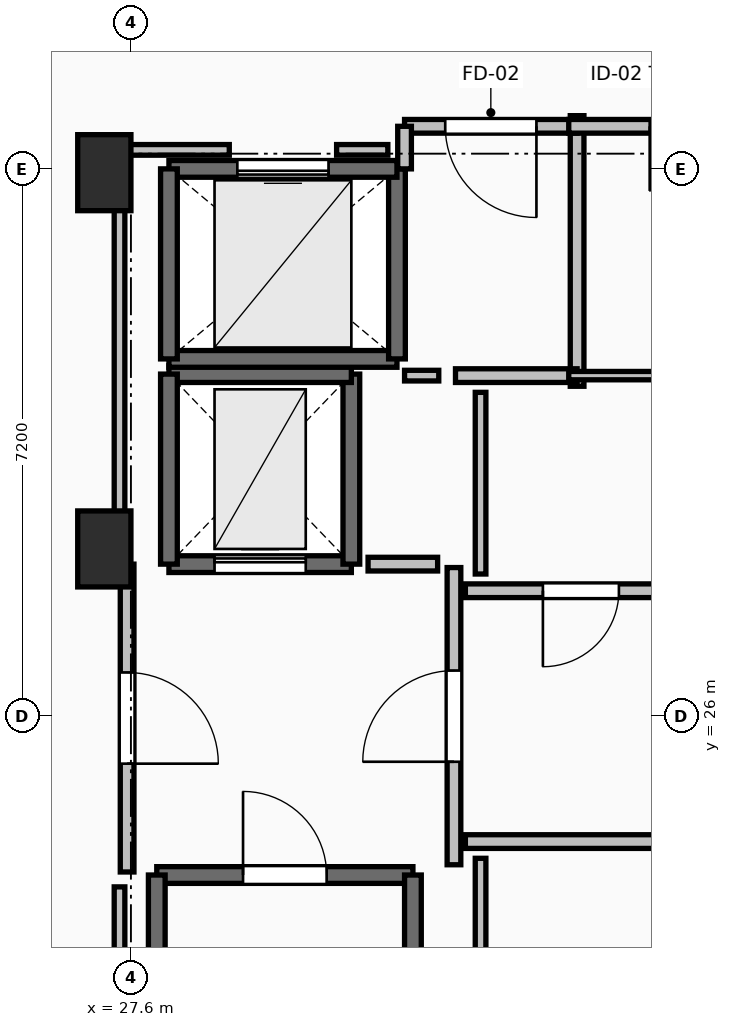
"""IFC4 building model, lengths in metres.
Left out: names, types, materials, properties, quantities, classifications, styles, units other than length and angle.
Written with IfcOpenShell. Run it as: python <this file> out.ifc"""

import sys

from ifc_helpers import new_model, si_unit, direction, frame, frame_2d, origin, origin_2d, place, context, subcontext, project, spatial, rectangle, extrude, element, fill, save


model = new_model("IFC4")
c1 = context("Model", 3, precision=1e-05, world=origin(), true_north=direction((0.0, 1.0)))
c2 = subcontext(c1, "Body", "Model", "MODEL_VIEW")
j1 = project(units=[si_unit("LENGTHUNIT", "METRE"), si_unit("PLANEANGLEUNIT", "RADIAN")], contexts=[c1])
p1 = place(None, origin())
s1 = spatial("IfcSite", under=j1, at=p1, CompositionType="ELEMENT")
p2 = place(p1, origin())
s2 = spatial("IfcBuilding", under=s1, at=p2, CompositionType="ELEMENT")
p3 = place(p2, frame((0.0, 0.0, 262.65)))
s3 = spatial("IfcBuildingStorey", under=s2, at=p3, CompositionType="ELEMENT", Elevation=262.65)
for number, where, z_axis, x_axis in (
    (1, (27.25, 28.2, 0.0), (0.0, 0.0, 1.0), (1.0, 0.0, 0.0)),
    (2, (27.25, 33.15, 0.0), (0.0, 0.0, 1.0), (1.0, 0.0, 0.0)),
):
    element("IfcColumn", number, at=place(p3, frame(where, z_axis=z_axis, x_axis=x_axis)), inside=s3, PredefinedType="PILASTER", context=c2, shape_type="SweptSolid", body=[
        extrude(rectangle(XDim=0.7, YDim=1.0, at=origin_2d()), origin(), (0.0, 0.0, 1.0), 3.55),
    ])
p4 = place(p3, frame((27.94, 23.91, 0.0), z_axis=(0.0, 0.0, 1.0), x_axis=(1.0, 0.0, 0.0)))
e3 = element("IfcWall", 3, at=p4, inside=s3, PredefinedType="SOLIDWALL", context=c2, shape_type="SweptSolid", body=[
    extrude(rectangle(XDim=3.37, YDim=0.22, at=frame_2d((1.685, 0.0))), origin(), (0.0, 0.0, 1.0), 3.29),
])
p5 = place(p4, frame((1.135, 0.0, 0.0)))
e4 = element("IfcOpeningElement", 4, at=p5, cuts=e3, PredefinedType="OPENING", context=c2, shape_type="SweptSolid", body=[
    extrude(rectangle(XDim=1.1, YDim=2.15, at=frame_2d((0.55, 1.075))), frame((0.0, 0.125, 0.0), z_axis=(0.0, -1.0, 0.0), x_axis=(1.0, 0.0, 0.0)), (0.0, 0.0, 1.0), 0.25),
])
for number, where, z_axis, x_axis in (
    (5, (31.31, 23.91, 0.0), (0.0, 0.0, 1.0), (0.0, -1.0, 0.0)),
    (6, (27.94, 16.49, 0.0), (0.0, 0.0, 1.0), (0.0, 1.0, 0.0)),
):
    element("IfcWall", number, at=place(p3, frame(where, z_axis=z_axis, x_axis=x_axis)), inside=s3, PredefinedType="SOLIDWALL", context=c2, shape_type="SweptSolid", body=[
        extrude(rectangle(XDim=7.42, YDim=0.22, at=frame_2d((3.71, 0.0))), origin(), (0.0, 0.0, 1.0), 3.29),
    ])
p6 = place(p3, frame((28.1, 28.0, 0.0), z_axis=(0.0, 0.0, 1.0), x_axis=(1.0, 0.0, 0.0)))
e7 = element("IfcWall", 7, at=p6, inside=s3, PredefinedType="SHEAR", context=c2, shape_type="SweptSolid", body=[
    extrude(rectangle(XDim=2.4, YDim=0.22, at=frame_2d((1.2, 0.0))), origin(), (0.0, 0.0, 1.0), 3.29),
])
p7 = place(p6, frame((0.6, 0.0, 0.0)))
e8 = element("IfcOpeningElement", 8, at=p7, cuts=e7, PredefinedType="OPENING", context=c2, shape_type="SweptSolid", body=[
    extrude(rectangle(XDim=1.2, YDim=2.2, at=frame_2d((0.6, 1.1))), frame((0.0, 0.125, 0.0), z_axis=(0.0, -1.0, 0.0), x_axis=(1.0, 0.0, 0.0)), (0.0, 0.0, 1.0), 0.25),
])
p8 = place(p3, frame((30.5, 28.0, 0.0), z_axis=(0.0, 0.0, 1.0), x_axis=(0.0, 1.0, 0.0)))
e9 = element("IfcWall", 9, at=p8, inside=s3, PredefinedType="SHEAR", context=c2, shape_type="SweptSolid", body=[
    extrude(rectangle(XDim=2.5, YDim=0.22, at=frame_2d((1.25, 0.0))), origin(), (0.0, 0.0, 1.0), 3.29),
])
p9 = place(p3, frame((30.5, 30.5, 0.0), z_axis=(0.0, 0.0, 1.0), x_axis=(-1.0, 0.0, 0.0)))
e10 = element("IfcWall", 10, at=p9, inside=s3, PredefinedType="SHEAR", context=c2, shape_type="SweptSolid", body=[
    extrude(rectangle(XDim=2.4, YDim=0.22, at=frame_2d((1.2, 0.0))), origin(), (0.0, 0.0, 1.0), 3.29),
])
p10 = place(p3, frame((28.1, 30.5, 0.0), z_axis=(0.0, 0.0, 1.0), x_axis=(0.0, -1.0, 0.0)))
e11 = element("IfcWall", 11, at=p10, inside=s3, PredefinedType="SHEAR", context=c2, shape_type="SweptSolid", body=[
    extrude(rectangle(XDim=2.5, YDim=0.22, at=frame_2d((1.25, 0.0))), origin(), (0.0, 0.0, 1.0), 3.29),
])
p11 = place(p3, frame((28.1, 30.7, 0.0), z_axis=(0.0, 0.0, 1.0), x_axis=(1.0, 0.0, 0.0)))
e12 = element("IfcWall", 12, at=p11, inside=s3, PredefinedType="SOLIDWALL", context=c2, shape_type="SweptSolid", body=[
    extrude(rectangle(XDim=3.0, YDim=0.22, at=frame_2d((1.5, 0.0))), origin(), (0.0, 0.0, 1.0), 3.29),
])
p12 = place(p3, frame((31.1, 30.7, 0.0), z_axis=(0.0, 0.0, 1.0), x_axis=(0.0, 1.0, 0.0)))
e13 = element("IfcWall", 13, at=p12, inside=s3, PredefinedType="SOLIDWALL", context=c2, shape_type="SweptSolid", body=[
    extrude(rectangle(XDim=2.5, YDim=0.22, at=frame_2d((1.25, 0.0))), origin(), (0.0, 0.0, 1.0), 3.29),
])
p13 = place(p3, frame((31.1, 33.2, 0.0), z_axis=(0.0, 0.0, 1.0), x_axis=(-1.0, 0.0, 0.0)))
e14 = element("IfcWall", 14, at=p13, inside=s3, PredefinedType="SOLIDWALL", context=c2, shape_type="SweptSolid", body=[
    extrude(rectangle(XDim=3.0, YDim=0.22, at=frame_2d((1.5, 0.0))), origin(), (0.0, 0.0, 1.0), 3.29),
])
p14 = place(p13, frame((0.9, 0.0, 0.0)))
e15 = element("IfcOpeningElement", 15, at=p14, cuts=e14, PredefinedType="OPENING", context=c2, shape_type="SweptSolid", body=[
    extrude(rectangle(XDim=1.2, YDim=2.2, at=frame_2d((0.6, 1.1))), frame((0.0, 0.125, 0.0), z_axis=(0.0, -1.0, 0.0), x_axis=(1.0, 0.0, 0.0)), (0.0, 0.0, 1.0), 0.25),
])
p15 = place(p3, frame((28.1, 33.2, 0.0), z_axis=(0.0, 0.0, 1.0), x_axis=(0.0, -1.0, 0.0)))
e16 = element("IfcWall", 16, at=p15, inside=s3, PredefinedType="SOLIDWALL", context=c2, shape_type="SweptSolid", body=[
    extrude(rectangle(XDim=2.5, YDim=0.22, at=frame_2d((1.25, 0.0))), origin(), (0.0, 0.0, 1.0), 3.29),
])
p16 = place(p3, frame((31.85, 24.045, 0.0), z_axis=(0.0, 0.0, 1.0), x_axis=(0.0, 1.0, 0.0)))
e17 = element("IfcWall", 17, at=p16, inside=s3, PredefinedType="PARTITIONING", context=c2, shape_type="SweptSolid", body=[
    extrude(rectangle(XDim=3.91, YDim=0.18, at=frame_2d((1.955, 0.0))), origin(), (0.0, 0.0, 1.0), 3.29),
])
p17 = place(p16, frame((1.355, 0.0, 0.0)))
e18 = element("IfcOpeningElement", 18, at=p17, cuts=e17, PredefinedType="OPENING", context=c2, shape_type="SweptSolid", body=[
    extrude(rectangle(XDim=1.2, YDim=2.15, at=frame_2d((0.6, 1.075))), frame((0.0, 0.105, 0.0), z_axis=(0.0, -1.0, 0.0), x_axis=(1.0, 0.0, 0.0)), (0.0, 0.0, 1.0), 0.21),
])
p18 = place(p3, frame((27.55, 28.0, 0.0), z_axis=(0.0, 0.0, 1.0), x_axis=(0.0, -1.0, 0.0)))
e19 = element("IfcWall", 19, at=p18, inside=s3, PredefinedType="PARTITIONING", context=c2, shape_type="SweptSolid", body=[
    extrude(rectangle(XDim=4.05, YDim=0.18, at=frame_2d((2.025, 0.0))), origin(), (0.0, 0.0, 1.0), 3.29),
])
p19 = place(p18, frame((1.425, 0.0, 0.0)))
e20 = element("IfcOpeningElement", 20, at=p19, cuts=e19, PredefinedType="OPENING", context=c2, shape_type="SweptSolid", body=[
    extrude(rectangle(XDim=1.2, YDim=2.15, at=frame_2d((0.6, 1.075))), frame((0.0, 0.105, 0.0), z_axis=(0.0, -1.0, 0.0), x_axis=(1.0, 0.0, 0.0)), (0.0, 0.0, 1.0), 0.21),
])
p20 = place(p3, frame((33.47, 30.34, 0.0), z_axis=(0.0, 0.0, 1.0), x_axis=(0.0, 1.0, 0.0)))
e21 = element("IfcWall", 21, at=p20, inside=s3, PredefinedType="PARTITIONING", context=c2, shape_type="SweptSolid", body=[
    extrude(rectangle(XDim=3.56, YDim=0.18, at=frame_2d((1.78, 0.0))), origin(), (0.0, 0.0, 1.0), 3.29),
])
p21 = place(p3, frame((31.87, 30.48, 0.0), z_axis=(0.0, 0.0, 1.0), x_axis=(1.0, 0.0, 0.0)))
e22 = element("IfcWall", 22, at=p21, inside=s3, PredefinedType="PARTITIONING", context=c2, shape_type="SweptSolid", body=[
    extrude(rectangle(XDim=1.6, YDim=0.18, at=frame_2d((0.8, 0.0))), origin(), (0.0, 0.0, 1.0), 3.29),
])
p22 = place(p3, frame((33.47, 33.76, 0.0), z_axis=(0.0, 0.0, 1.0), x_axis=(-1.0, 0.0, 0.0)))
e23 = element("IfcWall", 23, at=p22, inside=s3, PredefinedType="PARTITIONING", context=c2, shape_type="SweptSolid", body=[
    extrude(rectangle(XDim=2.27, YDim=0.18, at=frame_2d((1.135, 0.0))), origin(), (0.0, 0.0, 1.0), 3.29),
])
p23 = place(p22, frame((0.535, 0.0, 0.0)))
e24 = element("IfcOpeningElement", 24, at=p23, cuts=e23, PredefinedType="OPENING", context=c2, shape_type="SweptSolid", body=[
    extrude(rectangle(XDim=1.2, YDim=2.15, at=frame_2d((0.6, 1.075))), frame((0.0, 0.105, 0.0), z_axis=(0.0, -1.0, 0.0), x_axis=(1.0, 0.0, 0.0)), (0.0, 0.0, 1.0), 0.21),
])
p24 = place(p3, frame((31.2, 33.76, 0.0), z_axis=(0.0, 0.0, 1.0), x_axis=(0.0, -1.0, 0.0)))
e25 = element("IfcWall", 25, at=p24, inside=s3, PredefinedType="PARTITIONING", context=c2, shape_type="SweptSolid", body=[
    extrude(rectangle(XDim=0.56, YDim=0.18, at=frame_2d((0.28, 0.0))), origin(), (0.0, 0.0, 1.0), 3.29),
])
p25 = place(p3, frame((35.04, 27.65, 0.0), z_axis=(0.0, 0.0, 1.0), x_axis=(-1.0, 0.0, 0.0)))
e26 = element("IfcWall", 26, at=p25, inside=s3, PredefinedType="PARTITIONING", context=c2, shape_type="SweptSolid", body=[
    extrude(rectangle(XDim=3.04, YDim=0.18, at=frame_2d((1.52, 0.0))), origin(), (0.0, 0.0, 1.0), 3.29),
])
p26 = place(p25, frame((1.02, 0.0, 0.0)))
e27 = element("IfcOpeningElement", 27, at=p26, cuts=e26, PredefinedType="OPENING", context=c2, shape_type="SweptSolid", body=[
    extrude(rectangle(XDim=1.0, YDim=2.15, at=frame_2d((0.5, 1.075))), frame((0.0, 0.105, 0.0), z_axis=(0.0, -1.0, 0.0), x_axis=(1.0, 0.0, 0.0)), (0.0, 0.0, 1.0), 0.21),
])
p27 = place(p3, frame((32.0, 24.35, 0.0), z_axis=(0.0, 0.0, 1.0), x_axis=(1.0, 0.0, 0.0)))
e28 = element("IfcWall", 28, at=p27, inside=s3, PredefinedType="PARTITIONING", context=c2, shape_type="SweptSolid", body=[
    extrude(rectangle(XDim=6.645, YDim=0.18, at=frame_2d((3.323, 0.0))), origin(), (0.0, 0.0, 1.0), 3.29),
])
p28 = place(p27, frame((2.897, 0.0, 0.0)))
e29 = element("IfcOpeningElement", 29, at=p28, cuts=e28, PredefinedType="OPENING", context=c2, shape_type="SweptSolid", body=[
    extrude(rectangle(XDim=0.85, YDim=2.1, at=frame_2d((0.425, 1.05))), frame((0.0, 0.105, 0.0), z_axis=(0.0, -1.0, 0.0), x_axis=(1.0, 0.0, 0.0)), (0.0, 0.0, 1.0), 0.21),
])
p29 = place(p3, frame((33.36, 30.48, 0.0), z_axis=(0.0, 0.0, 1.0), x_axis=(1.0, 0.0, 0.0)))
e30 = element("IfcWall", 30, at=p29, inside=s3, PredefinedType="PARTITIONING", context=c2, shape_type="SweptSolid", body=[
    extrude(rectangle(XDim=1.81, YDim=0.11, at=frame_2d((0.905, 0.0))), origin(), (0.0, 0.0, 1.0), 3.29),
])
p30 = place(p3, frame((36.34, 33.76, 0.0), z_axis=(0.0, 0.0, 1.0), x_axis=(-1.0, 0.0, 0.0)))
e31 = element("IfcWall", 31, at=p30, inside=s3, PredefinedType="PARTITIONING", context=c2, shape_type="SweptSolid", body=[
    extrude(rectangle(XDim=2.98, YDim=0.18, at=frame_2d((1.49, 0.0))), origin(), (0.0, 0.0, 1.0), 3.29),
])
p31 = place(p30, frame((1.065, 0.0, 0.0)))
e32 = element("IfcOpeningElement", 32, at=p31, cuts=e31, PredefinedType="OPENING", context=c2, shape_type="SweptSolid", body=[
    extrude(rectangle(XDim=0.85, YDim=2.1, at=frame_2d((0.425, 1.05))), frame((0.0, 0.105, 0.0), z_axis=(0.0, -1.0, 0.0), x_axis=(1.0, 0.0, 0.0)), (0.0, 0.0, 1.0), 0.21),
])
p32 = place(p3, frame((31.635, 28.0, 0.0), z_axis=(0.0, 0.0, 1.0), x_axis=(-1.0, 0.0, 0.0)))
e33 = element("IfcWall", 33, at=p32, inside=s3, PredefinedType="PARTITIONING", context=c2, shape_type="SweptSolid", body=[
    extrude(rectangle(XDim=0.915, YDim=0.18, at=frame_2d((0.458, 0.0))), origin(), (0.0, 0.0, 1.0), 3.29),
])
p33 = place(p3, frame((31.2, 30.48, 0.0), z_axis=(0.0, 0.0, 1.0), x_axis=(1.0, 0.0, 0.0)))
e34 = element("IfcWall", 34, at=p33, inside=s3, PredefinedType="PARTITIONING", context=c2, shape_type="SweptSolid", body=[
    extrude(rectangle(XDim=0.45, YDim=0.14, at=frame_2d((0.225, 0.0))), origin(), (0.0, 0.0, 1.0), 3.29),
])
p34 = place(p3, frame((32.2, 30.26, 0.0), z_axis=(0.0, 0.0, 1.0), x_axis=(0.0, -1.0, 0.0)))
e35 = element("IfcWall", 35, at=p34, inside=s3, PredefinedType="PARTITIONING", context=c2, shape_type="SweptSolid", body=[
    extrude(rectangle(XDim=2.39, YDim=0.14, at=frame_2d((1.195, 0.0))), origin(), (0.0, 0.0, 1.0), 3.29),
])
p35 = place(p3, frame((32.2, 24.13, 0.0), z_axis=(0.0, 0.0, 1.0), x_axis=(0.0, -1.0, 0.0)))
e36 = element("IfcWall", 36, at=p35, inside=s3, PredefinedType="PARTITIONING", context=c2, shape_type="SweptSolid", body=[
    extrude(rectangle(XDim=2.46, YDim=0.14, at=frame_2d((1.23, 0.0))), origin(), (0.0, 0.0, 1.0), 2.482),
])
p36 = place(p3, frame((30.98, 33.45, 0.0), z_axis=(0.0, 0.0, 1.0), x_axis=(-1.0, 0.0, 0.0)))
e37 = element("IfcWall", 37, at=p36, inside=s3, PredefinedType="PARTITIONING", context=c2, shape_type="SweptSolid", body=[
    extrude(rectangle(XDim=0.674, YDim=0.14, at=frame_2d((0.337, 0.0))), origin(), (0.0, 0.0, 1.0), 3.29),
])
p37 = place(p3, frame((28.894, 33.45, 0.0), z_axis=(0.0, 0.0, 1.0), x_axis=(-1.0, 0.0, 0.0)))
e38 = element("IfcWall", 38, at=p37, inside=s3, PredefinedType="PARTITIONING", context=c2, shape_type="SweptSolid", body=[
    extrude(rectangle(XDim=1.444, YDim=0.14, at=frame_2d((0.722, 0.0))), origin(), (0.0, 0.0, 1.0), 2.482),
])
p38 = place(p3, frame((27.45, 33.45, 0.0), z_axis=(0.0, 0.0, 1.0), x_axis=(0.0, -1.0, 0.0)))
e39 = element("IfcWall", 39, at=p38, inside=s3, PredefinedType="PARTITIONING", context=c2, shape_type="SweptSolid", body=[
    extrude(rectangle(XDim=5.254, YDim=0.14, at=frame_2d((2.627, 0.0))), origin(), (0.0, 0.0, 1.0), 2.482),
])
p39 = place(p3, frame((27.45, 23.754, 0.0), z_axis=(0.0, 0.0, 1.0), x_axis=(0.0, -1.0, 0.0)))
e40 = element("IfcWall", 40, at=p39, inside=s3, PredefinedType="PARTITIONING", context=c2, shape_type="SweptSolid", body=[
    extrude(rectangle(XDim=7.514, YDim=0.14, at=frame_2d((3.757, 0.0))), origin(), (0.0, 0.0, 1.0), 2.482),
])
p40 = place(p5, origin())
e41 = element("IfcDoor", 41, at=p40, inside=s3, OperationType="SINGLE_SWING_LEFT", PredefinedType="DOOR", context=c2, shape_type="SweptSolid", body=[
    extrude(rectangle(XDim=1.1, YDim=2.15, at=frame_2d((0.55, 1.075))), frame((0.0, 0.025, 0.0), z_axis=(0.0, -1.0, 0.0), x_axis=(1.0, 0.0, 0.0)), (0.0, 0.0, 1.0), 0.05),
])
fill(e4, e41)
p41 = place(p7, origin())
e42 = element("IfcDoor", 42, at=p41, inside=s3, OperationType="SLIDING_TO_LEFT", PredefinedType="DOOR", context=c2, shape_type="SweptSolid", body=[
    extrude(rectangle(XDim=1.2, YDim=2.2, at=frame_2d((0.6, 1.1))), frame((0.0, 0.025, 0.0), z_axis=(0.0, -1.0, 0.0), x_axis=(1.0, 0.0, 0.0)), (0.0, 0.0, 1.0), 0.05),
])
fill(e8, e42)
p42 = place(p14, origin())
e43 = element("IfcDoor", 43, at=p42, inside=s3, OperationType="SLIDING_TO_LEFT", PredefinedType="DOOR", context=c2, shape_type="SweptSolid", body=[
    extrude(rectangle(XDim=1.2, YDim=2.2, at=frame_2d((0.6, 1.1))), frame((0.0, 0.025, 0.0), z_axis=(0.0, -1.0, 0.0), x_axis=(1.0, 0.0, 0.0)), (0.0, 0.0, 1.0), 0.05),
])
fill(e15, e43)
p43 = place(p17, origin())
e44 = element("IfcDoor", 44, at=p43, inside=s3, OperationType="SINGLE_SWING_LEFT", PredefinedType="DOOR", context=c2, shape_type="SweptSolid", body=[
    extrude(rectangle(XDim=1.2, YDim=2.15, at=frame_2d((0.6, 1.075))), frame((0.0, 0.025, 0.0), z_axis=(0.0, -1.0, 0.0), x_axis=(1.0, 0.0, 0.0)), (0.0, 0.0, 1.0), 0.05),
])
fill(e18, e44)
p44 = place(p19, origin())
e45 = element("IfcDoor", 45, at=p44, inside=s3, OperationType="SINGLE_SWING_RIGHT", PredefinedType="DOOR", context=c2, shape_type="SweptSolid", body=[
    extrude(rectangle(XDim=1.2, YDim=2.15, at=frame_2d((0.6, 1.075))), frame((0.0, 0.025, 0.0), z_axis=(0.0, -1.0, 0.0), x_axis=(1.0, 0.0, 0.0)), (0.0, 0.0, 1.0), 0.05),
])
fill(e20, e45)
p45 = place(p23, origin())
e46 = element("IfcDoor", 46, at=p45, inside=s3, OperationType="SINGLE_SWING_LEFT", PredefinedType="DOOR", context=c2, shape_type="SweptSolid", body=[
    extrude(rectangle(XDim=1.2, YDim=2.15, at=frame_2d((0.6, 1.075))), frame((0.0, 0.025, 0.0), z_axis=(0.0, -1.0, 0.0), x_axis=(1.0, 0.0, 0.0)), (0.0, 0.0, 1.0), 0.05),
])
fill(e24, e46)
p46 = place(p26, origin())
e47 = element("IfcDoor", 47, at=p46, inside=s3, OperationType="SINGLE_SWING_RIGHT", PredefinedType="DOOR", context=c2, shape_type="SweptSolid", body=[
    extrude(rectangle(XDim=1.0, YDim=2.15, at=frame_2d((0.5, 1.075))), frame((0.0, 0.025, 0.0), z_axis=(0.0, -1.0, 0.0), x_axis=(1.0, 0.0, 0.0)), (0.0, 0.0, 1.0), 0.05),
])
fill(e27, e47)
p47 = place(p31, origin())
e48 = element("IfcDoor", 48, at=p47, inside=s3, OperationType="SINGLE_SWING_RIGHT", PredefinedType="DOOR", context=c2, shape_type="SweptSolid", body=[
    extrude(rectangle(XDim=0.85, YDim=2.1, at=frame_2d((0.425, 1.05))), frame((0.0, 0.025, 0.0), z_axis=(0.0, -1.0, 0.0), x_axis=(1.0, 0.0, 0.0)), (0.0, 0.0, 1.0), 0.05),
])
fill(e32, e48)
save(model, sys.argv[1])
